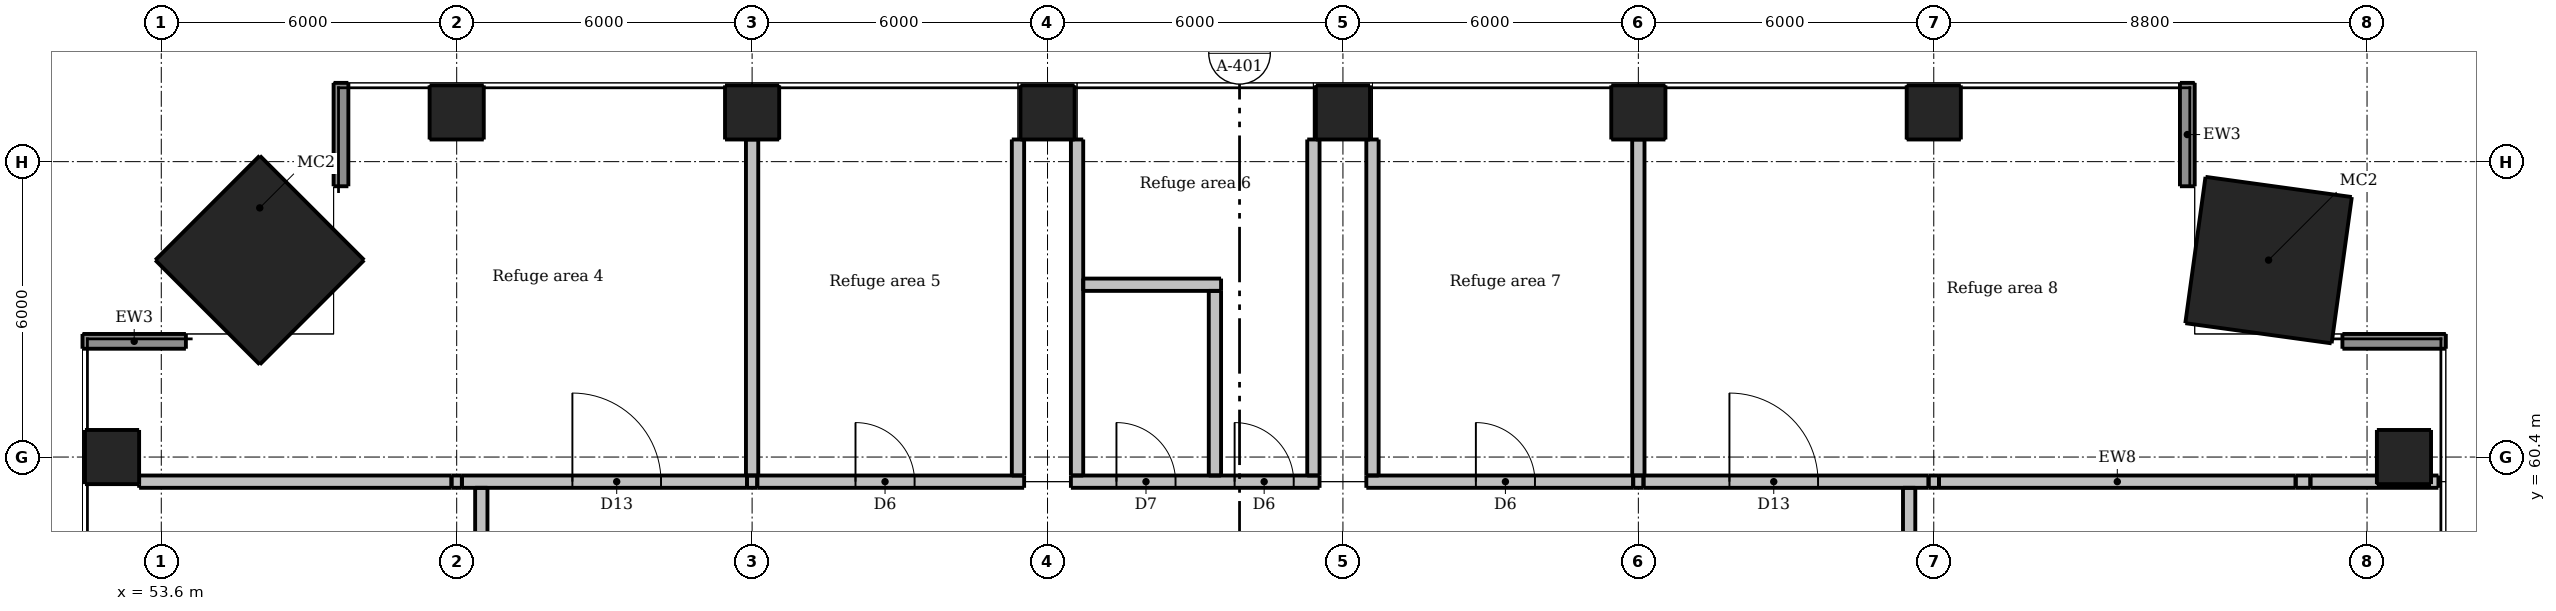
"""IFC4 building model, lengths in metres.
Left out: names, types, materials, properties, quantities, classifications, styles, units other than length and angle.
Written with IfcOpenShell. Run it as: python <this file> out.ifc"""

import sys

from ifc_helpers import new_model, si_unit, direction, frame, frame_2d, origin, origin_2d, place, context, subcontext, project, spatial, rectangle, extrude, element, fill, save


model = new_model("IFC4")
c1 = context("Model", 3, precision=1e-05, world=origin(), true_north=direction((0.0, 1.0)))
c2 = subcontext(c1, "Body", "Model", "MODEL_VIEW")
j1 = project(units=[si_unit("LENGTHUNIT", "METRE"), si_unit("PLANEANGLEUNIT", "RADIAN")], contexts=[c1])
p1 = place(None, origin())
s1 = spatial("IfcSite", under=j1, at=p1, CompositionType="ELEMENT")
p2 = place(p1, origin())
s2 = spatial("IfcBuilding", under=s1, at=p2, CompositionType="ELEMENT")
p3 = place(p2, frame((0.0, 0.0, 124.9)))
s3 = spatial("IfcBuildingStorey", under=s2, at=p3, CompositionType="ELEMENT", Elevation=124.9)
p4 = place(p3, frame((99.15, 60.4, -0.206), z_axis=(-0.260958148913, 0.0, 0.965350114992), x_axis=(0.0, -1.0, 0.0)))
e1 = element("IfcColumn", 1, at=p4, inside=s3, PredefinedType="COLUMN", context=c2, shape_type="SweptSolid", body=[
    extrude(rectangle(XDim=1.1, YDim=1.1, at=origin_2d()), origin(), (0.0, 0.0, 1.0), 9.388),
])
for number, where, z_axis, x_axis in (
    (2, (59.6, 67.4, 0.0), (0.0, 0.0, 1.0), (1.0, 0.0, 0.0)),
    (3, (65.6, 67.4, 0.0), (0.0, 0.0, 1.0), (1.0, 0.0, 0.0)),
    (4, (71.6, 67.4, 0.0), (0.0, 0.0, 1.0), (1.0, 0.0, 0.0)),
    (5, (77.6, 67.4, 0.0), (0.0, 0.0, 1.0), (1.0, 0.0, 0.0)),
    (6, (83.6, 67.4, 0.0), (0.0, 0.0, 1.0), (1.0, 0.0, 0.0)),
    (7, (89.6, 67.4, 0.0), (0.0, 0.0, 1.0), (1.0, 0.0, 0.0)),
    (8, (52.6, 60.4, 0.0), (0.0, 0.0, 1.0), (1.0, 0.0, 0.0)),
):
    element("IfcColumn", number, at=place(p3, frame(where, z_axis=z_axis, x_axis=x_axis)), inside=s3, PredefinedType="COLUMN", context=c2, shape_type="SweptSolid", body=[
        extrude(rectangle(XDim=1.1, YDim=1.1, at=origin_2d()), origin(), (0.0, 0.0, 1.0), 8.75),
    ])
p5 = place(p3, frame((96.4, 64.4, 0.593), z_axis=(-0.347540304026, -0.047926504293, 0.936439419965), x_axis=(0.937625836423, -0.008630010973, 0.347538938512)))
e9 = element("IfcColumn", 9, at=p5, inside=s3, PredefinedType="COLUMN", context=c2, shape_type="SweptSolid", body=[
    extrude(rectangle(XDim=3.0, YDim=3.0, at=origin_2d()), origin(), (0.0, 0.0, 1.0), 8.344),
])
p6 = place(p3, frame((55.6, 64.4, 0.137), z_axis=(0.045735036797, -0.045735036797, 0.99790611423), x_axis=(0.001046942885, 0.998953057115, 0.045735036797)))
e10 = element("IfcColumn", 10, at=p6, inside=s3, PredefinedType="COLUMN", context=c2, shape_type="SweptSolid", body=[
    extrude(rectangle(XDim=3.0, YDim=3.0, at=origin_2d()), origin(), (0.0, 0.0, 1.0), 8.744),
])
for number, where, z_axis, x_axis in (
    (11, (100.0, 62.75, 0.0), (0.0, 0.0, 1.0), (-1.0, 0.0, 0.0)),
    (12, (94.75, 65.9, 0.0), (0.0, 0.0, 1.0), (0.0, 1.0, 0.0)),
    (13, (57.25, 68.0, 0.0), (0.0, 0.0, 1.0), (0.0, -1.0, 0.0)),
    (14, (54.1, 62.75, 0.0), (0.0, 0.0, 1.0), (-1.0, 0.0, 0.0)),
):
    element("IfcWall", number, at=place(p3, frame(where, z_axis=z_axis, x_axis=x_axis)), inside=s3, PredefinedType="SOLIDWALL", context=c2, shape_type="SweptSolid", body=[
        extrude(rectangle(XDim=2.1, YDim=0.3, at=frame_2d((1.05, 0.0))), origin(), (0.0, 0.0, 1.0), 8.75),
    ])
p7 = place(p3, frame((53.15, 59.9, 0.0), z_axis=(0.0, 0.0, 1.0), x_axis=(1.0, 0.0, 0.0)))
e15 = element("IfcWall", 15, at=p7, inside=s3, PredefinedType="SOLIDWALL", context=c2, shape_type="SweptSolid", body=[
    extrude(rectangle(XDim=6.345, YDim=0.25, at=frame_2d((3.172, 0.0))), origin(), (0.0, 0.0, 1.0), 8.75),
])
p8 = place(p3, frame((59.495, 59.9, 0.0), z_axis=(0.0, 0.0, 1.0), x_axis=(1.0, 0.0, 0.0)))
e16 = element("IfcWall", 16, at=p8, inside=s3, PredefinedType="SOLIDWALL", context=c2, shape_type="SweptSolid", body=[
    extrude(rectangle(XDim=0.211, YDim=0.25, at=frame_2d((0.105, 0.0))), origin(), (0.0, 0.0, 1.0), 8.211),
])
p9 = place(p3, frame((59.705, 59.9, 0.0), z_axis=(0.0, 0.0, 1.0), x_axis=(1.0, 0.0, 0.0)))
e17 = element("IfcWall", 17, at=p9, inside=s3, PredefinedType="SOLIDWALL", context=c2, shape_type="SweptSolid", body=[
    extrude(rectangle(XDim=5.79, YDim=0.25, at=frame_2d((2.895, 0.0))), origin(), (0.0, 0.0, 1.0), 8.75),
])
p10 = place(p9, frame((2.245, 0.0, 0.0)))
e18 = element("IfcOpeningElement", 18, at=p10, cuts=e17, PredefinedType="OPENING", context=c2, shape_type="SweptSolid", body=[
    extrude(rectangle(XDim=1.8, YDim=2.1, at=frame_2d((0.9, 1.05))), frame((0.0, 0.135, 0.0), z_axis=(0.0, -1.0, 0.0), x_axis=(1.0, 0.0, 0.0)), (0.0, 0.0, 1.0), 0.27),
])
p11 = place(p3, frame((65.495, 59.9, 0.0), z_axis=(0.0, 0.0, 1.0), x_axis=(1.0, 0.0, 0.0)))
e19 = element("IfcWall", 19, at=p11, inside=s3, PredefinedType="SOLIDWALL", context=c2, shape_type="SweptSolid", body=[
    extrude(rectangle(XDim=0.209, YDim=0.25, at=frame_2d((0.104, 0.0))), origin(), (0.0, 0.0, 1.0), 8.217),
])
p12 = place(p3, frame((65.705, 59.9, 0.0), z_axis=(0.0, 0.0, 1.0), x_axis=(1.0, 0.0, 0.0)))
e20 = element("IfcWall", 20, at=p12, inside=s3, PredefinedType="SOLIDWALL", context=c2, shape_type="SweptSolid", body=[
    extrude(rectangle(XDim=5.42, YDim=0.25, at=frame_2d((2.71, 0.0))), origin(), (0.0, 0.0, 1.0), 8.75),
])
p13 = place(p12, frame((1.995, 0.0, 0.0)))
e21 = element("IfcOpeningElement", 21, at=p13, cuts=e20, PredefinedType="OPENING", context=c2, shape_type="SweptSolid", body=[
    extrude(rectangle(XDim=1.2, YDim=2.1, at=frame_2d((0.6, 1.05))), frame((0.0, 0.135, 0.0), z_axis=(0.0, -1.0, 0.0), x_axis=(1.0, 0.0, 0.0)), (0.0, 0.0, 1.0), 0.27),
])
p14 = place(p3, frame((72.075, 59.9, 0.0), z_axis=(0.0, 0.0, 1.0), x_axis=(1.0, 0.0, 0.0)))
e22 = element("IfcWall", 22, at=p14, inside=s3, PredefinedType="SOLIDWALL", context=c2, shape_type="SweptSolid", body=[
    extrude(rectangle(XDim=5.05, YDim=0.25, at=frame_2d((2.525, 0.0))), origin(), (0.0, 0.0, 1.0), 8.75),
])
p15 = place(p14, frame((0.925, 0.0, 0.0)))
e23 = element("IfcOpeningElement", 23, at=p15, cuts=e22, PredefinedType="OPENING", context=c2, shape_type="SweptSolid", body=[
    extrude(rectangle(XDim=1.2, YDim=2.1, at=frame_2d((0.6, 1.05))), frame((0.0, 0.135, 0.0), z_axis=(0.0, -1.0, 0.0), x_axis=(1.0, 0.0, 0.0)), (0.0, 0.0, 1.0), 0.27),
])
p16 = place(p14, frame((3.325, 0.0, 0.0)))
e24 = element("IfcOpeningElement", 24, at=p16, cuts=e22, PredefinedType="OPENING", context=c2, shape_type="SweptSolid", body=[
    extrude(rectangle(XDim=1.2, YDim=2.1, at=frame_2d((0.6, 1.05))), frame((0.0, 0.135, 0.0), z_axis=(0.0, -1.0, 0.0), x_axis=(1.0, 0.0, 0.0)), (0.0, 0.0, 1.0), 0.27),
])
p17 = place(p3, frame((78.075, 59.9, 0.0), z_axis=(0.0, 0.0, 1.0), x_axis=(1.0, 0.0, 0.0)))
e25 = element("IfcWall", 25, at=p17, inside=s3, PredefinedType="SOLIDWALL", context=c2, shape_type="SweptSolid", body=[
    extrude(rectangle(XDim=5.42, YDim=0.25, at=frame_2d((2.71, 0.0))), origin(), (0.0, 0.0, 1.0), 8.75),
])
p18 = place(p17, frame((2.225, 0.0, 0.0)))
e26 = element("IfcOpeningElement", 26, at=p18, cuts=e25, PredefinedType="OPENING", context=c2, shape_type="SweptSolid", body=[
    extrude(rectangle(XDim=1.2, YDim=2.1, at=frame_2d((0.6, 1.05))), frame((0.0, 0.135, 0.0), z_axis=(0.0, -1.0, 0.0), x_axis=(1.0, 0.0, 0.0)), (0.0, 0.0, 1.0), 0.27),
])
p19 = place(p3, frame((83.495, 59.9, 0.0), z_axis=(0.0, 0.0, 1.0), x_axis=(1.0, 0.0, 0.0)))
e27 = element("IfcWall", 27, at=p19, inside=s3, PredefinedType="SOLIDWALL", context=c2, shape_type="SweptSolid", body=[
    extrude(rectangle(XDim=0.209, YDim=0.25, at=frame_2d((0.104, 0.0))), origin(), (0.0, 0.0, 1.0), 8.217),
])
p20 = place(p3, frame((83.705, 59.9, 0.0), z_axis=(0.0, 0.0, 1.0), x_axis=(1.0, 0.0, 0.0)))
e28 = element("IfcWall", 28, at=p20, inside=s3, PredefinedType="SOLIDWALL", context=c2, shape_type="SweptSolid", body=[
    extrude(rectangle(XDim=5.79, YDim=0.25, at=frame_2d((2.895, 0.0))), origin(), (0.0, 0.0, 1.0), 8.75),
])
p21 = place(p20, frame((1.745, 0.0, 0.0)))
e29 = element("IfcOpeningElement", 29, at=p21, cuts=e28, PredefinedType="OPENING", context=c2, shape_type="SweptSolid", body=[
    extrude(rectangle(XDim=1.8, YDim=2.1, at=frame_2d((0.9, 1.05))), frame((0.0, 0.135, 0.0), z_axis=(0.0, -1.0, 0.0), x_axis=(1.0, 0.0, 0.0)), (0.0, 0.0, 1.0), 0.27),
])
p22 = place(p3, frame((89.495, 59.9, 0.0), z_axis=(0.0, 0.0, 1.0), x_axis=(1.0, 0.0, 0.0)))
e30 = element("IfcWall", 30, at=p22, inside=s3, PredefinedType="SOLIDWALL", context=c2, shape_type="SweptSolid", body=[
    extrude(rectangle(XDim=0.211, YDim=0.25, at=frame_2d((0.105, 0.0))), origin(), (0.0, 0.0, 1.0), 8.211),
])
p23 = place(p3, frame((89.705, 59.9, 0.0), z_axis=(0.0, 0.0, 1.0), x_axis=(1.0, 0.0, 0.0)))
e31 = element("IfcWall", 31, at=p23, inside=s3, PredefinedType="SOLIDWALL", context=c2, shape_type="SweptSolid", body=[
    extrude(rectangle(XDim=7.245, YDim=0.25, at=frame_2d((3.622, 0.0))), origin(), (0.0, 0.0, 1.0), 8.75),
])
p24 = place(p3, frame((96.95, 59.9, 0.0), z_axis=(0.0, 0.0, 1.0), x_axis=(1.0, 0.0, 0.0)))
e32 = element("IfcWall", 32, at=p24, inside=s3, PredefinedType="SOLIDWALL", context=c2, shape_type="SweptSolid", body=[
    extrude(rectangle(XDim=0.3, YDim=0.25, at=frame_2d((0.15, 0.0))), origin(), (0.0, 0.0, 1.0), 8.25),
])
p25 = place(p3, frame((97.25, 59.9, 0.0), z_axis=(0.0, 0.0, 1.0), x_axis=(1.0, 0.0, 0.0)))
e33 = element("IfcWall", 33, at=p25, inside=s3, PredefinedType="SOLIDWALL", context=c2, shape_type="SweptSolid", body=[
    extrude(rectangle(XDim=2.6, YDim=0.25, at=frame_2d((1.3, 0.0))), origin(), (0.0, 0.0, 1.0), 8.75),
])
p26 = place(p3, frame((72.325, 63.9, 0.0), z_axis=(0.0, 0.0, 1.0), x_axis=(1.0, 0.0, 0.0)))
e34 = element("IfcWall", 34, at=p26, inside=s3, PredefinedType="SOLIDWALL", context=c2, shape_type="SweptSolid", body=[
    extrude(rectangle(XDim=2.8, YDim=0.25, at=frame_2d((1.4, 0.0))), origin(), (0.0, 0.0, 1.0), 8.75),
])
p27 = place(p3, frame((60.1, 54.505, 0.0), z_axis=(0.0, 0.0, 1.0), x_axis=(0.0, 1.0, 0.0)))
e35 = element("IfcWall", 35, at=p27, inside=s3, PredefinedType="SOLIDWALL", context=c2, shape_type="SweptSolid", body=[
    extrude(rectangle(XDim=5.27, YDim=0.25, at=frame_2d((2.635, 0.0))), origin(), (0.0, 0.0, 1.0), 8.75),
])
p28 = place(p27, frame((0.045, 0.0, 0.0)))
e36 = element("IfcOpeningElement", 36, at=p28, cuts=e35, PredefinedType="OPENING", context=c2, shape_type="SweptSolid", body=[
    extrude(rectangle(XDim=1.8, YDim=2.1, at=frame_2d((0.9, 1.05))), frame((0.0, 0.135, 0.0), z_axis=(0.0, -1.0, 0.0), x_axis=(1.0, 0.0, 0.0)), (0.0, 0.0, 1.0), 0.27),
])
p29 = place(p3, frame((65.6, 60.025, 0.0), z_axis=(0.0, 0.0, 1.0), x_axis=(0.0, 1.0, 0.0)))
e37 = element("IfcWall", 37, at=p29, inside=s3, PredefinedType="SOLIDWALL", context=c2, shape_type="SweptSolid", body=[
    extrude(rectangle(XDim=6.825, YDim=0.25, at=frame_2d((3.413, 0.0))), origin(), (0.0, 0.0, 1.0), 8.217),
])
for number, where, z_axis, x_axis in (
    (38, (71.0, 60.025, 0.0), (0.0, 0.0, 1.0), (0.0, 1.0, 0.0)),
    (39, (72.2, 60.025, 0.0), (0.0, 0.0, 1.0), (0.0, 1.0, 0.0)),
):
    element("IfcWall", number, at=place(p3, frame(where, z_axis=z_axis, x_axis=x_axis)), inside=s3, PredefinedType="SOLIDWALL", context=c2, shape_type="SweptSolid", body=[
        extrude(rectangle(XDim=6.825, YDim=0.25, at=frame_2d((3.413, 0.0))), origin(), (0.0, 0.0, 1.0), 8.75),
    ])
p30 = place(p3, frame((75.0, 60.025, 0.0), z_axis=(0.0, 0.0, 1.0), x_axis=(0.0, 1.0, 0.0)))
e40 = element("IfcWall", 40, at=p30, inside=s3, PredefinedType="SOLIDWALL", context=c2, shape_type="SweptSolid", body=[
    extrude(rectangle(XDim=3.75, YDim=0.25, at=frame_2d((1.875, 0.0))), origin(), (0.0, 0.0, 1.0), 8.75),
])
for number, where, z_axis, x_axis in (
    (41, (77.0, 60.025, 0.0), (0.0, 0.0, 1.0), (0.0, 1.0, 0.0)),
    (42, (78.2, 60.025, 0.0), (0.0, 0.0, 1.0), (0.0, 1.0, 0.0)),
):
    element("IfcWall", number, at=place(p3, frame(where, z_axis=z_axis, x_axis=x_axis)), inside=s3, PredefinedType="SOLIDWALL", context=c2, shape_type="SweptSolid", body=[
        extrude(rectangle(XDim=6.825, YDim=0.25, at=frame_2d((3.413, 0.0))), origin(), (0.0, 0.0, 1.0), 8.75),
    ])
p31 = place(p3, frame((83.6, 60.025, 0.0), z_axis=(0.0, 0.0, 1.0), x_axis=(0.0, 1.0, 0.0)))
e43 = element("IfcWall", 43, at=p31, inside=s3, PredefinedType="SOLIDWALL", context=c2, shape_type="SweptSolid", body=[
    extrude(rectangle(XDim=6.825, YDim=0.25, at=frame_2d((3.413, 0.0))), origin(), (0.0, 0.0, 1.0), 8.217),
])
p32 = place(p3, frame((89.1, 54.505, 0.0), z_axis=(0.0, 0.0, 1.0), x_axis=(0.0, 1.0, 0.0)))
e44 = element("IfcWall", 44, at=p32, inside=s3, PredefinedType="SOLIDWALL", context=c2, shape_type="SweptSolid", body=[
    extrude(rectangle(XDim=5.27, YDim=0.25, at=frame_2d((2.635, 0.0))), origin(), (0.0, 0.0, 1.0), 8.75),
])
p33 = place(p32, frame((0.045, 0.0, 0.0)))
e45 = element("IfcOpeningElement", 45, at=p33, cuts=e44, PredefinedType="OPENING", context=c2, shape_type="SweptSolid", body=[
    extrude(rectangle(XDim=1.8, YDim=2.1, at=frame_2d((0.9, 1.05))), frame((0.0, 0.135, 0.0), z_axis=(0.0, -1.0, 0.0), x_axis=(1.0, 0.0, 0.0)), (0.0, 0.0, 1.0), 0.27),
])
p34 = place(p10, origin())
e46 = element("IfcDoor", 46, at=p34, inside=s3, OperationType="DOUBLE_DOOR_SINGLE_SWING", PredefinedType="DOOR", context=c2, shape_type="SweptSolid", body=[
    extrude(rectangle(XDim=1.8, YDim=2.1, at=frame_2d((0.9, 1.05))), frame((0.0, 0.025, 0.0), z_axis=(0.0, -1.0, 0.0), x_axis=(1.0, 0.0, 0.0)), (0.0, 0.0, 1.0), 0.05),
])
fill(e18, e46)
p35 = place(p13, origin())
e47 = element("IfcDoor", 47, at=p35, inside=s3, OperationType="SINGLE_SWING_LEFT", PredefinedType="DOOR", context=c2, shape_type="SweptSolid", body=[
    extrude(rectangle(XDim=1.2, YDim=2.1, at=frame_2d((0.6, 1.05))), frame((0.0, 0.025, 0.0), z_axis=(0.0, -1.0, 0.0), x_axis=(1.0, 0.0, 0.0)), (0.0, 0.0, 1.0), 0.05),
])
fill(e21, e47)
p36 = place(p15, origin())
e48 = element("IfcDoor", 48, at=p36, inside=s3, OperationType="SINGLE_SWING_LEFT", PredefinedType="DOOR", context=c2, shape_type="SweptSolid", body=[
    extrude(rectangle(XDim=1.2, YDim=2.1, at=frame_2d((0.6, 1.05))), frame((0.0, 0.025, 0.0), z_axis=(0.0, -1.0, 0.0), x_axis=(1.0, 0.0, 0.0)), (0.0, 0.0, 1.0), 0.05),
])
fill(e23, e48)
p37 = place(p16, origin())
e49 = element("IfcDoor", 49, at=p37, inside=s3, OperationType="SINGLE_SWING_LEFT", PredefinedType="DOOR", context=c2, shape_type="SweptSolid", body=[
    extrude(rectangle(XDim=1.2, YDim=2.1, at=frame_2d((0.6, 1.05))), frame((0.0, 0.025, 0.0), z_axis=(0.0, -1.0, 0.0), x_axis=(1.0, 0.0, 0.0)), (0.0, 0.0, 1.0), 0.05),
])
fill(e24, e49)
p38 = place(p18, origin())
e50 = element("IfcDoor", 50, at=p38, inside=s3, OperationType="SINGLE_SWING_LEFT", PredefinedType="DOOR", context=c2, shape_type="SweptSolid", body=[
    extrude(rectangle(XDim=1.2, YDim=2.1, at=frame_2d((0.6, 1.05))), frame((0.0, 0.025, 0.0), z_axis=(0.0, -1.0, 0.0), x_axis=(1.0, 0.0, 0.0)), (0.0, 0.0, 1.0), 0.05),
])
fill(e26, e50)
p39 = place(p21, origin())
e51 = element("IfcDoor", 51, at=p39, inside=s3, OperationType="DOUBLE_DOOR_SINGLE_SWING", PredefinedType="DOOR", context=c2, shape_type="SweptSolid", body=[
    extrude(rectangle(XDim=1.8, YDim=2.1, at=frame_2d((0.9, 1.05))), frame((0.0, 0.025, 0.0), z_axis=(0.0, -1.0, 0.0), x_axis=(1.0, 0.0, 0.0)), (0.0, 0.0, 1.0), 0.05),
])
fill(e29, e51)
save(model, sys.argv[1])
